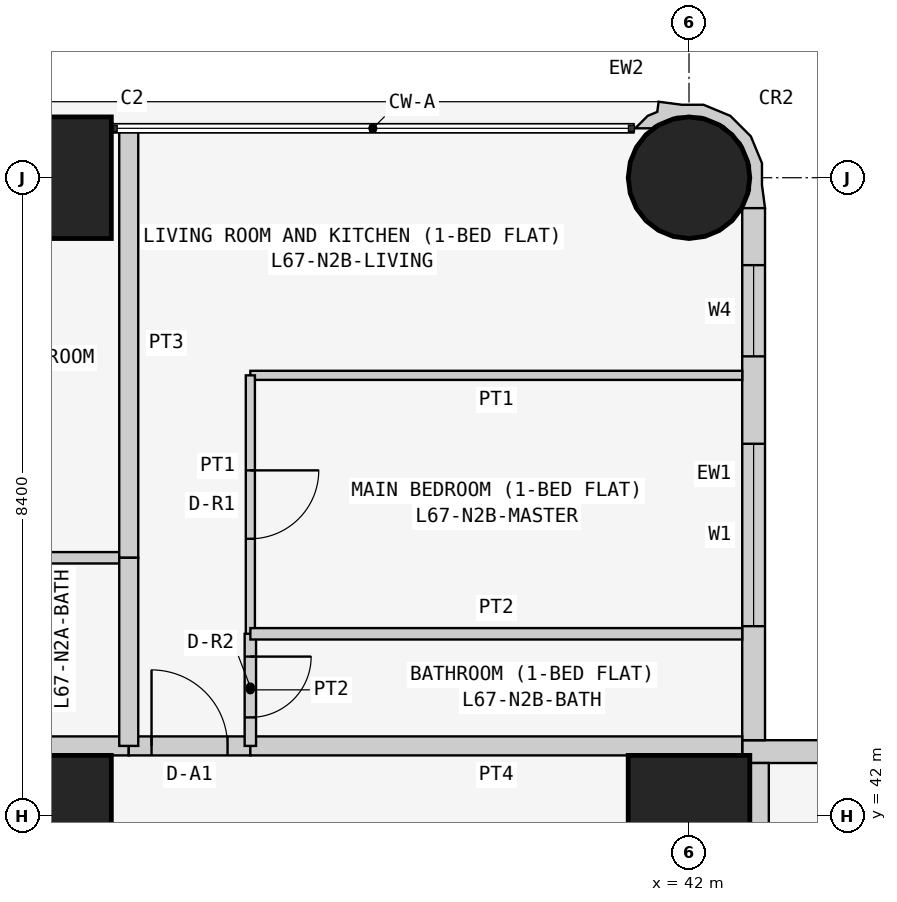
"""IFC4 building model, lengths in metres.
Left out: names, types, materials, properties, quantities, classifications, styles, units other than length and angle.
Written with IfcOpenShell. Run it as: python <this file> out.ifc"""

import sys

from ifc_helpers import new_model, si_unit, direction, frame, frame_2d, origin, origin_2d, place, context, subcontext, project, spatial, polyline, rectangle, circle, outline, extrude, element, fill, save


model = new_model("IFC4")
c1 = context("Model", 3, precision=1e-05, world=origin(), true_north=direction((0.0, 1.0)))
c2 = subcontext(c1, "Body", "Model", "MODEL_VIEW")
j1 = project(units=[si_unit("LENGTHUNIT", "METRE"), si_unit("PLANEANGLEUNIT", "RADIAN")], contexts=[c1])
p1 = place(None, origin())
s1 = spatial("IfcSite", under=j1, at=p1, CompositionType="ELEMENT")
p2 = place(p1, origin())
s2 = spatial("IfcBuilding", under=s1, at=p2, CompositionType="ELEMENT")
p3 = place(p2, frame((0.0, 0.0, 257.7)))
s3 = spatial("IfcBuildingStorey", under=s2, at=p3, CompositionType="ELEMENT", Elevation=257.7)
for number, where, z_axis, x_axis in (
    (1, (33.6, 42.0, 0.0), (0.0, 0.0, 1.0), (1.0, 0.0, 0.0)),
    (2, (33.6, 50.4, 0.0), (0.0, 0.0, 1.0), (1.0, 0.0, 0.0)),
    (3, (42.0, 42.0, 0.0), (0.0, 0.0, 1.0), (1.0, 0.0, 0.0)),
):
    element("IfcColumn", number, at=place(p3, frame(where, z_axis=z_axis, x_axis=x_axis)), inside=s3, PredefinedType="COLUMN", context=c2, shape_type="SweptSolid", body=[
        extrude(rectangle(XDim=1.6, YDim=1.6, at=origin_2d()), origin(), (0.0, 0.0, 1.0), 3.6),
    ])
p4 = place(p3, frame((42.0, 50.4, 0.0), z_axis=(0.0, 0.0, 1.0), x_axis=(1.0, 0.0, 0.0)))
e4 = element("IfcColumn", 4, at=p4, inside=s3, PredefinedType="COLUMN", context=c2, shape_type="SweptSolid", body=[
    extrude(circle(Radius=0.8, at=origin_2d()), origin(), (0.0, 0.0, 1.0), 3.6),
])
p5 = place(p3, frame((50.0, 42.85, 0.0), z_axis=(0.0, 0.0, 1.0), x_axis=(-1.0, 0.0, 0.0)))
e5 = element("IfcWall", 5, at=p5, inside=s3, PredefinedType="SOLIDWALL", context=c2, shape_type="SweptSolid", body=[
    extrude(rectangle(XDim=7.3, YDim=0.3, at=frame_2d((3.65, 0.0))), origin(), (0.0, 0.0, 1.0), 3.45),
])
p6 = place(p5, frame((3.1, 0.0, 0.9)))
e6 = element("IfcOpeningElement", 6, at=p6, cuts=e5, PredefinedType="OPENING", context=c2, shape_type="SweptSolid", body=[
    extrude(rectangle(XDim=2.4, YDim=1.5, at=frame_2d((1.2, 0.75))), frame((0.0, 0.16, 0.0), z_axis=(0.0, -1.0, 0.0), x_axis=(1.0, 0.0, 0.0)), (0.0, 0.0, 1.0), 0.32),
])
p7 = place(p5, frame((0.75, 0.0, 0.9)))
e7 = element("IfcOpeningElement", 7, at=p7, cuts=e5, PredefinedType="OPENING", context=c2, shape_type="SweptSolid", body=[
    extrude(rectangle(XDim=1.2, YDim=1.5, at=frame_2d((0.6, 0.75))), frame((0.0, 0.16, 0.0), z_axis=(0.0, -1.0, 0.0), x_axis=(1.0, 0.0, 0.0)), (0.0, 0.0, 1.0), 0.32),
])
p8 = place(p3, frame((42.85, 43.0, 0.0), z_axis=(0.0, 0.0, 1.0), x_axis=(0.0, 1.0, 0.0)))
e8 = element("IfcWall", 8, at=p8, inside=s3, PredefinedType="SOLIDWALL", context=c2, shape_type="SweptSolid", body=[
    extrude(rectangle(XDim=7.0, YDim=0.3, at=frame_2d((3.5, 0.0))), origin(), (0.0, 0.0, 1.0), 3.45),
])
p9 = place(p8, frame((1.5, 0.0, 0.9)))
e9 = element("IfcOpeningElement", 9, at=p9, cuts=e8, PredefinedType="OPENING", context=c2, shape_type="SweptSolid", body=[
    extrude(rectangle(XDim=2.4, YDim=1.5, at=frame_2d((1.2, 0.75))), frame((0.0, 0.16, 0.0), z_axis=(0.0, -1.0, 0.0), x_axis=(1.0, 0.0, 0.0)), (0.0, 0.0, 1.0), 0.32),
])
p10 = place(p8, frame((5.05, 0.0, 0.9)))
e10 = element("IfcOpeningElement", 10, at=p10, cuts=e8, PredefinedType="OPENING", context=c2, shape_type="SweptSolid", body=[
    extrude(rectangle(XDim=1.2, YDim=1.5, at=frame_2d((0.6, 0.75))), frame((0.0, 0.16, 0.0), z_axis=(0.0, -1.0, 0.0), x_axis=(1.0, 0.0, 0.0)), (0.0, 0.0, 1.0), 0.32),
])
p11 = place(p3, frame((42.817, 50.073, 0.0), z_axis=(0.0, 0.0, 1.0), x_axis=(0.343276641956, 0.93923434088, 0.0)))
e11 = element("IfcWall", 11, at=p11, inside=s3, PredefinedType="SOLIDWALL", context=c2, shape_type="SweptSolid", body=[
    extrude(outline(polyline([(0.266, -0.055), (0.535, 0.044), (0.817, 0.302), (0.978, 0.648), (0.994, 1.03), (0.895, 1.3), (0.828, 1.598), (0.697, 1.569), (0.604, 1.67), (0.394, 1.767), (0.471, 1.556), (0.509, 1.539), (0.724, 1.304), (0.833, 1.005), (0.82, 0.687), (0.686, 0.397), (0.451, 0.182), (0.152, 0.073), (-0.116, 0.084), (-0.128, 0.078), (-0.146, 0.071), (-0.006, -0.197), (0.266, -0.055)])), origin(), (0.0, 0.0, 1.0), 3.45),
])
p12 = place(p3, frame((32.0, 42.925, 0.0), z_axis=(0.0, 0.0, 1.0), x_axis=(1.0, 0.0, 0.0)))
e12 = element("IfcWall", 12, at=p12, inside=s3, PredefinedType="PARTITIONING", context=c2, shape_type="SweptSolid", body=[
    extrude(rectangle(XDim=2.629, YDim=0.25, at=frame_2d((1.314, 0.0))), origin(), (0.0, 0.0, 1.0), 3.45),
])
p13 = place(p3, frame((34.629, 42.925, 0.0), z_axis=(0.0, 0.0, 1.0), x_axis=(1.0, 0.0, 0.0)))
e13 = element("IfcWall", 13, at=p13, inside=s3, PredefinedType="PARTITIONING", context=c2, shape_type="SweptSolid", body=[
    extrude(rectangle(XDim=1.6, YDim=0.25, at=frame_2d((0.8, 0.0))), origin(), (0.0, 0.0, 1.0), 3.45),
])
p14 = place(p13, frame((0.3, 0.0, 0.0)))
e14 = element("IfcOpeningElement", 14, at=p14, cuts=e13, PredefinedType="OPENING", context=c2, shape_type="SweptSolid", body=[
    extrude(rectangle(XDim=1.0, YDim=2.1, at=frame_2d((0.5, 1.05))), frame((0.0, 0.135, 0.0), z_axis=(0.0, -1.0, 0.0), x_axis=(1.0, 0.0, 0.0)), (0.0, 0.0, 1.0), 0.27),
])
p15 = place(p3, frame((36.229, 42.925, 0.0), z_axis=(0.0, 0.0, 1.0), x_axis=(1.0, 0.0, 0.0)))
e15 = element("IfcWall", 15, at=p15, inside=s3, PredefinedType="PARTITIONING", context=c2, shape_type="SweptSolid", body=[
    extrude(rectangle(XDim=6.471, YDim=0.25, at=frame_2d((3.235, 0.0))), origin(), (0.0, 0.0, 1.0), 3.45),
])
p16 = place(p3, frame((42.925, 42.7, 0.0), z_axis=(0.0, 0.0, 1.0), x_axis=(0.0, -1.0, 0.0)))
e16 = element("IfcWall", 16, at=p16, inside=s3, PredefinedType="PARTITIONING", context=c2, shape_type="SweptSolid", body=[
    extrude(rectangle(XDim=6.871, YDim=0.25, at=frame_2d((3.436, 0.0))), origin(), (0.0, 0.0, 1.0), 3.45),
])
p17 = place(p3, frame((34.629, 45.4, 0.0), z_axis=(0.0, 0.0, 1.0), x_axis=(-1.0, 0.0, 0.0)))
e17 = element("IfcWall", 17, at=p17, inside=s3, PredefinedType="PARTITIONING", context=c2, shape_type="SweptSolid", body=[
    extrude(rectangle(XDim=2.629, YDim=0.15, at=frame_2d((1.314, 0.0))), origin(), (0.0, 0.0, 1.0), 3.45),
])
p18 = place(p3, frame((34.629, 51.05, 0.0), z_axis=(0.0, 0.0, 1.0), x_axis=(0.0, -1.0, 0.0)))
e18 = element("IfcWall", 18, at=p18, inside=s3, PredefinedType="PARTITIONING", context=c2, shape_type="SweptSolid", body=[
    extrude(rectangle(XDim=5.65, YDim=0.25, at=frame_2d((2.825, 0.0))), origin(), (0.0, 0.0, 1.0), 3.45),
])
p19 = place(p3, frame((34.629, 45.4, 0.0), z_axis=(0.0, 0.0, 1.0), x_axis=(0.0, -1.0, 0.0)))
e19 = element("IfcWall", 19, at=p19, inside=s3, PredefinedType="PARTITIONING", context=c2, shape_type="SweptSolid", body=[
    extrude(rectangle(XDim=2.475, YDim=0.25, at=frame_2d((1.237, 0.0))), origin(), (0.0, 0.0, 1.0), 3.45),
])
p20 = place(p3, frame((36.229, 44.4, 0.0), z_axis=(0.0, 0.0, 1.0), x_axis=(0.0, -1.0, 0.0)))
e20 = element("IfcWall", 20, at=p20, inside=s3, PredefinedType="PARTITIONING", context=c2, shape_type="SweptSolid", body=[
    extrude(rectangle(XDim=1.475, YDim=0.15, at=frame_2d((0.737, 0.0))), origin(), (0.0, 0.0, 1.0), 3.45),
])
p21 = place(p20, frame((0.3, 0.0, 0.0)))
e21 = element("IfcOpeningElement", 21, at=p21, cuts=e20, PredefinedType="OPENING", context=c2, shape_type="SweptSolid", body=[
    extrude(rectangle(XDim=0.8, YDim=2.1, at=frame_2d((0.4, 1.05))), frame((0.0, 0.085, 0.0), z_axis=(0.0, -1.0, 0.0), x_axis=(1.0, 0.0, 0.0)), (0.0, 0.0, 1.0), 0.17),
])
p22 = place(p3, frame((42.7, 47.8, 0.0), z_axis=(0.0, 0.0, 1.0), x_axis=(-1.0, 0.0, 0.0)))
e22 = element("IfcWall", 22, at=p22, inside=s3, PredefinedType="PARTITIONING", context=c2, shape_type="SweptSolid", body=[
    extrude(rectangle(XDim=6.471, YDim=0.12, at=frame_2d((3.235, 0.0))), origin(), (0.0, 0.0, 1.0), 3.45),
])
p23 = place(p3, frame((36.229, 47.8, 0.0), z_axis=(0.0, 0.0, 1.0), x_axis=(0.0, -1.0, 0.0)))
e23 = element("IfcWall", 23, at=p23, inside=s3, PredefinedType="PARTITIONING", context=c2, shape_type="SweptSolid", body=[
    extrude(rectangle(XDim=3.4, YDim=0.12, at=frame_2d((1.7, 0.0))), origin(), (0.0, 0.0, 1.0), 3.45),
])
p24 = place(p23, frame((1.25, 0.0, 0.0)))
e24 = element("IfcOpeningElement", 24, at=p24, cuts=e23, PredefinedType="OPENING", context=c2, shape_type="SweptSolid", body=[
    extrude(rectangle(XDim=0.9, YDim=2.1, at=frame_2d((0.45, 1.05))), frame((0.0, 0.07, 0.0), z_axis=(0.0, -1.0, 0.0), x_axis=(1.0, 0.0, 0.0)), (0.0, 0.0, 1.0), 0.14),
])
p25 = place(p3, frame((36.229, 44.4, 0.0), z_axis=(0.0, 0.0, 1.0), x_axis=(1.0, 0.0, 0.0)))
e25 = element("IfcWall", 25, at=p25, inside=s3, PredefinedType="PARTITIONING", context=c2, shape_type="SweptSolid", body=[
    extrude(rectangle(XDim=6.471, YDim=0.15, at=frame_2d((3.235, 0.0))), origin(), (0.0, 0.0, 1.0), 3.45),
])
p26 = place(p9, origin())
e26 = element("IfcWindow", 26, at=p26, inside=s3, PartitioningType="SINGLE_PANEL", PredefinedType="WINDOW", context=c2, shape_type="SweptSolid", body=[
    extrude(rectangle(XDim=2.4, YDim=1.5, at=frame_2d((1.2, 0.75))), frame((0.0, 0.03, 0.0), z_axis=(0.0, -1.0, 0.0), x_axis=(1.0, 0.0, 0.0)), (0.0, 0.0, 1.0), 0.06),
])
fill(e9, e26)
p27 = place(p10, origin())
e27 = element("IfcWindow", 27, at=p27, inside=s3, PartitioningType="SINGLE_PANEL", PredefinedType="WINDOW", context=c2, shape_type="SweptSolid", body=[
    extrude(rectangle(XDim=1.2, YDim=1.5, at=frame_2d((0.6, 0.75))), frame((0.0, 0.03, 0.0), z_axis=(0.0, -1.0, 0.0), x_axis=(1.0, 0.0, 0.0)), (0.0, 0.0, 1.0), 0.06),
])
fill(e10, e27)
p28 = place(p14, origin())
e28 = element("IfcDoor", 28, at=p28, inside=s3, OperationType="SINGLE_SWING_LEFT", PredefinedType="DOOR", context=c2, shape_type="SweptSolid", body=[
    extrude(rectangle(XDim=1.0, YDim=2.1, at=frame_2d((0.5, 1.05))), frame((0.0, 0.025, 0.0), z_axis=(0.0, -1.0, 0.0), x_axis=(1.0, 0.0, 0.0)), (0.0, 0.0, 1.0), 0.05),
])
fill(e14, e28)
p29 = place(p21, origin())
e29 = element("IfcDoor", 29, at=p29, inside=s3, OperationType="SINGLE_SWING_LEFT", PredefinedType="DOOR", context=c2, shape_type="SweptSolid", body=[
    extrude(rectangle(XDim=0.8, YDim=2.1, at=frame_2d((0.4, 1.05))), frame((0.0, 0.025, 0.0), z_axis=(0.0, -1.0, 0.0), x_axis=(1.0, 0.0, 0.0)), (0.0, 0.0, 1.0), 0.05),
])
fill(e21, e29)
p30 = place(p24, origin())
e30 = element("IfcDoor", 30, at=p30, inside=s3, OperationType="SINGLE_SWING_LEFT", PredefinedType="DOOR", context=c2, shape_type="SweptSolid", body=[
    extrude(rectangle(XDim=0.9, YDim=2.1, at=frame_2d((0.45, 1.05))), frame((0.0, 0.025, 0.0), z_axis=(0.0, -1.0, 0.0), x_axis=(1.0, 0.0, 0.0)), (0.0, 0.0, 1.0), 0.05),
])
fill(e24, e30)
save(model, sys.argv[1])
